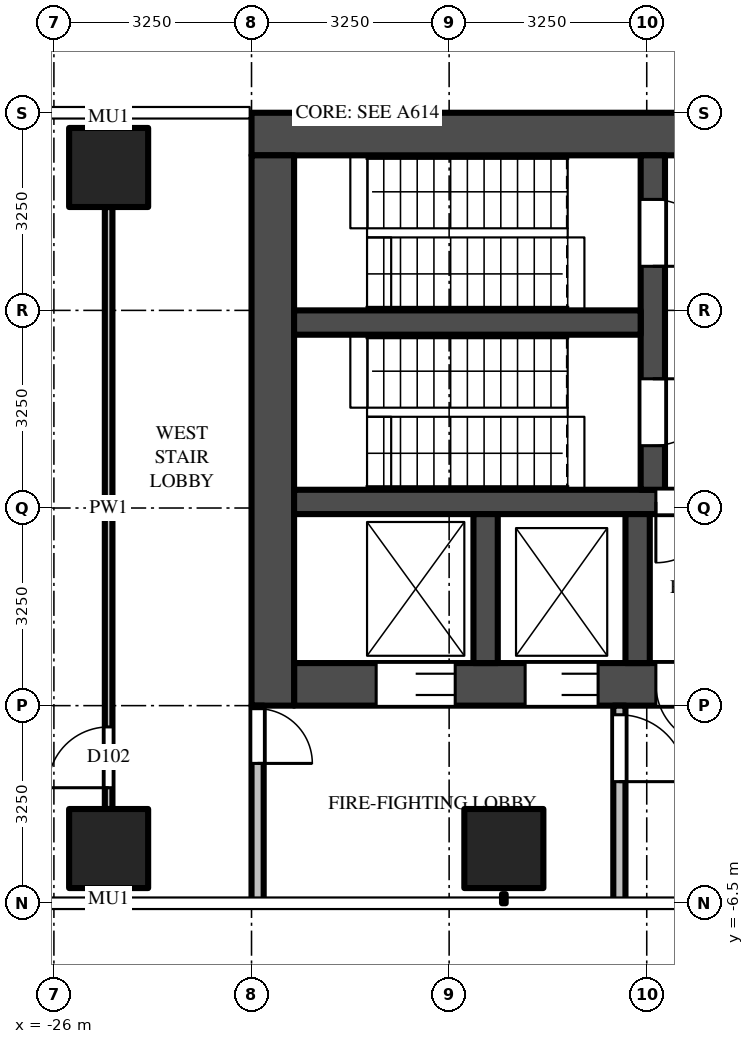
"""IFC4 building model, lengths in metres.
Left out: names, types, materials, properties, quantities, classifications, styles, units other than length and angle.
Written with IfcOpenShell. Run it as: python <this file> out.ifc"""

import sys

from ifc_helpers import new_model, si_unit, direction, frame, frame_2d, origin, origin_2d, place, context, subcontext, project, spatial, rectangle, extrude, source, transform, mapped, element, fill, save


model = new_model("IFC4")
c1 = context("Model", 3, precision=1e-05, world=origin(), true_north=direction((0.0, 1.0)))
c2 = subcontext(c1, "Body", "Model", "MODEL_VIEW")
j1 = project(units=[si_unit("LENGTHUNIT", "METRE"), si_unit("PLANEANGLEUNIT", "RADIAN")], contexts=[c1])
p1 = place(None, origin())
s1 = spatial("IfcSite", under=j1, at=p1, CompositionType="ELEMENT")
p2 = place(p1, origin())
s2 = spatial("IfcBuilding", under=s1, at=p2, CompositionType="ELEMENT")
p3 = place(p2, frame((0.0, 0.0, 111.0)))
s3 = spatial("IfcBuildingStorey", under=s2, at=p3, CompositionType="ELEMENT", Elevation=111.0)
m1 = source(origin(), c2, "Body", "SweptSolid", [
    extrude(rectangle(XDim=1.3, YDim=1.3, at=origin_2d()), origin(), (0.0, 0.0, 1.0), 4.5),
])
for number, where, z_axis, x_axis in (
    (1, (-18.6, -5.6, 0.0), (0.0, 0.0, 1.0), (1.0, 0.0, 0.0)),
    (2, (-25.1, -5.6, 0.0), (0.0, 0.0, 1.0), (1.0, 0.0, 0.0)),
    (3, (-25.1, 5.6, 0.0), (0.0, 0.0, 1.0), (1.0, 0.0, 0.0)),
):
    element("IfcColumn", number, at=place(p3, frame(where, z_axis=z_axis, x_axis=x_axis)), inside=s3, PredefinedType="COLUMN", context=c2, shape_type="MappedRepresentation", body=[
        mapped(m1, transform((0.0, 0.0, 0.0))),
    ])
m2 = source(origin(), c2, "Body", "SweptSolid", [
    extrude(rectangle(XDim=16.5, YDim=0.7, at=frame_2d((8.25, 0.0))), origin(), (0.0, 0.0, 1.0), 4.25),
])
p4 = place(p3, frame((-6.25, 6.15, 0.0), z_axis=(0.0, 0.0, 1.0), x_axis=(-1.0, 0.0, 0.0)))
e4 = element("IfcWall", 4, at=p4, inside=s3, PredefinedType="SHEAR", context=c2, shape_type="MappedRepresentation", body=[
    mapped(m2, transform((0.0, 0.0, 0.0))),
])
m3 = source(origin(), c2, "Body", "SweptSolid", [
    extrude(rectangle(XDim=14.85, YDim=0.7, at=frame_2d((7.425, 0.0))), origin(), (0.0, 0.0, 1.0), 4.25),
])
p5 = place(p3, frame((-7.2, -2.9, 0.0), z_axis=(0.0, 0.0, 1.0), x_axis=(-1.0, 0.0, 0.0)))
e5 = element("IfcWall", 5, at=p5, inside=s3, PredefinedType="SHEAR", context=c2, shape_type="MappedRepresentation", body=[
    mapped(m3, transform((0.0, 0.0, 0.0))),
])
m4 = source(origin(), c2, "Body", "SweptSolid", [
    extrude(rectangle(XDim=1.3, YDim=2.1, at=frame_2d((0.65, 1.05))), frame((0.0, 0.36, 0.0), z_axis=(0.0, -1.0, 0.0), x_axis=(1.0, 0.0, 0.0)), (0.0, 0.0, 1.0), 0.72),
])
p6 = place(p5, frame((12.2, 0.0, 0.0)))
e6 = element("IfcOpeningElement", 6, at=p6, cuts=e5, PredefinedType="OPENING", context=c2, shape_type="MappedRepresentation", body=[
    mapped(m4, transform((0.0, 0.0, 0.0))),
])
m5 = source(origin(), c2, "Body", "SweptSolid", [
    extrude(rectangle(XDim=1.2, YDim=2.1, at=frame_2d((0.6, 1.05))), frame((0.0, 0.36, 0.0), z_axis=(0.0, -1.0, 0.0), x_axis=(1.0, 0.0, 0.0)), (0.0, 0.0, 1.0), 0.72),
])
p7 = place(p5, frame((9.85, 0.0, 0.0)))
e7 = element("IfcOpeningElement", 7, at=p7, cuts=e5, PredefinedType="OPENING", context=c2, shape_type="MappedRepresentation", body=[
    mapped(m5, transform((0.0, 0.0, 0.0))),
])
m6 = source(origin(), c2, "Body", "SweptSolid", [
    extrude(rectangle(XDim=1.0, YDim=2.1, at=frame_2d((0.5, 1.05))), frame((0.0, 0.36, 0.0), z_axis=(0.0, -1.0, 0.0), x_axis=(1.0, 0.0, 0.0)), (0.0, 0.0, 1.0), 0.72),
])
p8 = place(p5, frame((7.9, 0.0, 0.0)))
e8 = element("IfcOpeningElement", 8, at=p8, cuts=e5, PredefinedType="OPENING", context=c2, shape_type="MappedRepresentation", body=[
    mapped(m6, transform((0.0, 0.0, 0.0))),
])
m7 = source(origin(), c2, "Body", "SweptSolid", [
    extrude(rectangle(XDim=0.8, YDim=2.1, at=frame_2d((0.4, 1.05))), frame((0.0, 0.36, 0.0), z_axis=(0.0, -1.0, 0.0), x_axis=(1.0, 0.0, 0.0)), (0.0, 0.0, 1.0), 0.72),
])
p9 = place(p5, frame((0.113, 0.0, 0.0)))
e9 = element("IfcOpeningElement", 9, at=p9, cuts=e5, PredefinedType="OPENING", context=c2, shape_type="MappedRepresentation", body=[
    mapped(m7, transform((0.0, 0.0, 0.0))),
])
p10 = place(p5, frame((1.288, 0.0, 0.0)))
e10 = element("IfcOpeningElement", 10, at=p10, cuts=e5, PredefinedType="OPENING", context=c2, shape_type="MappedRepresentation", body=[
    mapped(m7, transform((0.0, 0.0, 0.0))),
])
p11 = place(p5, frame((2.712, 0.0, 0.0)))
e11 = element("IfcOpeningElement", 11, at=p11, cuts=e5, PredefinedType="OPENING", context=c2, shape_type="MappedRepresentation", body=[
    mapped(m7, transform((0.0, 0.0, 0.0))),
])
p12 = place(p5, frame((3.887, 0.0, 0.0)))
e12 = element("IfcOpeningElement", 12, at=p12, cuts=e5, PredefinedType="OPENING", context=c2, shape_type="MappedRepresentation", body=[
    mapped(m7, transform((0.0, 0.0, 0.0))),
])
p13 = place(p5, frame((5.312, 0.0, 0.0)))
e13 = element("IfcOpeningElement", 13, at=p13, cuts=e5, PredefinedType="OPENING", context=c2, shape_type="MappedRepresentation", body=[
    mapped(m7, transform((0.0, 0.0, 0.0))),
])
p14 = place(p5, frame((6.488, 0.0, 0.0)))
e14 = element("IfcOpeningElement", 14, at=p14, cuts=e5, PredefinedType="OPENING", context=c2, shape_type="MappedRepresentation", body=[
    mapped(m7, transform((0.0, 0.0, 0.0))),
])
m8 = source(origin(), c2, "Body", "SweptSolid", [
    extrude(rectangle(XDim=9.05, YDim=0.7, at=frame_2d((4.525, 0.0))), origin(), (0.0, 0.0, 1.0), 4.25),
])
p15 = place(p3, frame((-22.4, 5.8, 0.0), z_axis=(0.0, 0.0, 1.0), x_axis=(0.0, -1.0, 0.0)))
e15 = element("IfcWall", 15, at=p15, inside=s3, PredefinedType="SHEAR", context=c2, shape_type="MappedRepresentation", body=[
    mapped(m8, transform((0.0, 0.0, 0.0))),
])
m9 = source(origin(), c2, "Body", "SweptSolid", [
    extrude(rectangle(XDim=14.85, YDim=0.4, at=frame_2d((7.425, 0.0))), origin(), (0.0, 0.0, 1.0), 4.25),
])
p16 = place(p3, frame((-7.2, 0.1, 0.0), z_axis=(0.0, 0.0, 1.0), x_axis=(-1.0, 0.0, 0.0)))
e16 = element("IfcWall", 16, at=p16, inside=s3, PredefinedType="SHEAR", context=c2, shape_type="MappedRepresentation", body=[
    mapped(m9, transform((0.0, 0.0, 0.0))),
])
m10 = source(origin(), c2, "Body", "SweptSolid", [
    extrude(rectangle(XDim=1.0, YDim=2.1, at=frame_2d((0.5, 1.05))), frame((0.0, 0.21, 0.0), z_axis=(0.0, -1.0, 0.0), x_axis=(1.0, 0.0, 0.0)), (0.0, 0.0, 1.0), 0.42),
])
p17 = place(p16, frame((7.9, 0.0, 0.0)))
e17 = element("IfcOpeningElement", 17, at=p17, cuts=e16, PredefinedType="OPENING", context=c2, shape_type="MappedRepresentation", body=[
    mapped(m10, transform((0.0, 0.0, 0.0))),
])
m11 = source(origin(), c2, "Body", "SweptSolid", [
    extrude(rectangle(XDim=5.5, YDim=0.4, at=frame_2d((2.75, 0.0))), origin(), (0.0, 0.0, 1.0), 4.25),
])
p18 = place(p3, frame((-16.15, 5.8, 0.0), z_axis=(0.0, 0.0, 1.0), x_axis=(0.0, -1.0, 0.0)))
e18 = element("IfcWall", 18, at=p18, inside=s3, PredefinedType="SHEAR", context=c2, shape_type="MappedRepresentation", body=[
    mapped(m11, transform((0.0, 0.0, 0.0))),
])
m12 = source(origin(), c2, "Body", "SweptSolid", [
    extrude(rectangle(XDim=1.1, YDim=2.1, at=frame_2d((0.55, 1.05))), frame((0.0, 0.21, 0.0), z_axis=(0.0, -1.0, 0.0), x_axis=(1.0, 0.0, 0.0)), (0.0, 0.0, 1.0), 0.42),
])
p19 = place(p18, frame((0.725, 0.0, 0.0)))
e19 = element("IfcOpeningElement", 19, at=p19, cuts=e18, PredefinedType="OPENING", context=c2, shape_type="MappedRepresentation", body=[
    mapped(m12, transform((0.0, 0.0, 0.0))),
])
p20 = place(p18, frame((3.675, 0.0, 0.0)))
e20 = element("IfcOpeningElement", 20, at=p20, cuts=e18, PredefinedType="OPENING", context=c2, shape_type="MappedRepresentation", body=[
    mapped(m12, transform((0.0, 0.0, 0.0))),
])
m13 = source(origin(), c2, "Body", "SweptSolid", [
    extrude(rectangle(XDim=5.7, YDim=0.4, at=frame_2d((2.85, 0.0))), origin(), (0.0, 0.0, 1.0), 4.25),
])
p21 = place(p3, frame((-16.35, 3.05, 0.0), z_axis=(0.0, 0.0, 1.0), x_axis=(-1.0, 0.0, 0.0)))
e21 = element("IfcWall", 21, at=p21, inside=s3, PredefinedType="SHEAR", context=c2, shape_type="MappedRepresentation", body=[
    mapped(m13, transform((0.0, 0.0, 0.0))),
])
m14 = source(origin(), c2, "Body", "SweptSolid", [
    extrude(rectangle(XDim=2.45, YDim=0.4, at=frame_2d((1.225, 0.0))), origin(), (0.0, 0.0, 1.0), 4.25),
])
for number, where, z_axis, x_axis in (
    (22, (-16.4, -0.1, 0.0), (0.0, 0.0, 1.0), (0.0, -1.0, 0.0)),
    (23, (-18.9, -0.1, 0.0), (0.0, 0.0, 1.0), (0.0, -1.0, 0.0)),
):
    element("IfcWall", number, at=place(p3, frame(where, z_axis=z_axis, x_axis=x_axis)), inside=s3, PredefinedType="SHEAR", context=c2, shape_type="MappedRepresentation", body=[
        mapped(m14, transform((0.0, 0.0, 0.0))),
    ])
m15 = source(origin(), c2, "Body", "SweptSolid", [
    extrude(rectangle(XDim=3.25, YDim=0.2, at=frame_2d((1.625, 0.0))), origin(), (0.0, 0.0, 1.0), 4.25),
])
p22 = place(p3, frame((-16.7, -3.25, 0.0), z_axis=(0.0, 0.0, 1.0), x_axis=(0.0, -1.0, 0.0)))
e24 = element("IfcWall", 24, at=p22, inside=s3, PredefinedType="PARTITIONING", context=c2, shape_type="MappedRepresentation", body=[
    mapped(m15, transform((0.0, 0.0, 0.0))),
])
m16 = source(origin(), c2, "Body", "SweptSolid", [
    extrude(rectangle(XDim=1.1, YDim=2.1, at=frame_2d((0.55, 1.05))), frame((0.0, 0.11, 0.0), z_axis=(0.0, -1.0, 0.0), x_axis=(1.0, 0.0, 0.0)), (0.0, 0.0, 1.0), 0.22),
])
p23 = place(p22, frame((0.15, 0.0, 0.0)))
e25 = element("IfcOpeningElement", 25, at=p23, cuts=e24, PredefinedType="OPENING", context=c2, shape_type="MappedRepresentation", body=[
    mapped(m16, transform((0.0, 0.0, 0.0))),
])
p24 = place(p3, frame((-22.65, -3.25, 0.0), z_axis=(0.0, 0.0, 1.0), x_axis=(0.0, -1.0, 0.0)))
e26 = element("IfcWall", 26, at=p24, inside=s3, PredefinedType="PARTITIONING", context=c2, shape_type="MappedRepresentation", body=[
    mapped(m15, transform((0.0, 0.0, 0.0))),
])
m17 = source(origin(), c2, "Body", "SweptSolid", [
    extrude(rectangle(XDim=0.9, YDim=2.1, at=frame_2d((0.45, 1.05))), frame((0.0, 0.11, 0.0), z_axis=(0.0, -1.0, 0.0), x_axis=(1.0, 0.0, 0.0)), (0.0, 0.0, 1.0), 0.22),
])
p25 = place(p24, frame((0.05, 0.0, 0.0)))
e27 = element("IfcOpeningElement", 27, at=p25, cuts=e26, PredefinedType="OPENING", context=c2, shape_type="MappedRepresentation", body=[
    mapped(m17, transform((0.0, 0.0, 0.0))),
])
m18 = source(origin(), c2, "Body", "SweptSolid", [
    extrude(rectangle(XDim=9.9, YDim=0.125, at=frame_2d((4.95, 0.0))), origin(), (0.0, 0.0, 1.0), 3.468),
])
p26 = place(p3, frame((-25.1, -4.95, 0.0), z_axis=(0.0, 0.0, 1.0), x_axis=(0.0, 1.0, 0.0)))
e28 = element("IfcWall", 28, at=p26, inside=s3, PredefinedType="PARTITIONING", context=c2, shape_type="MappedRepresentation", body=[
    mapped(m18, transform((0.0, 0.0, 0.0))),
])
m19 = source(origin(), c2, "Body", "SweptSolid", [
    extrude(rectangle(XDim=1.0, YDim=2.1, at=frame_2d((0.5, 1.05))), frame((0.0, 0.073, 0.0), z_axis=(0.0, -1.0, 0.0), x_axis=(1.0, 0.0, 0.0)), (0.0, 0.0, 1.0), 0.145),
])
p27 = place(p26, frame((0.35, 0.0, 0.0)))
e29 = element("IfcOpeningElement", 29, at=p27, cuts=e28, PredefinedType="OPENING", context=c2, shape_type="MappedRepresentation", body=[
    mapped(m19, transform((0.0, 0.0, 0.0))),
])
m20 = source(origin(), c2, "Body", "SweptSolid", [
    extrude(rectangle(XDim=1.3, YDim=2.1, at=frame_2d((0.65, 1.05))), frame((0.0, -0.275, 0.0), z_axis=(0.0, -1.0, 0.0), x_axis=(1.0, 0.0, 0.0)), (0.0, 0.0, 1.0), 0.05),
])
p28 = place(p6, origin())
e30 = element("IfcDoor", 30, at=p28, inside=s3, OperationType="DOUBLE_DOOR_SLIDING", PredefinedType="DOOR", context=c2, shape_type="MappedRepresentation", body=[
    mapped(m20, transform((0.0, 0.0, 0.0))),
])
fill(e6, e30)
m21 = source(origin(), c2, "Body", "SweptSolid", [
    extrude(rectangle(XDim=1.2, YDim=2.1, at=frame_2d((0.6, 1.05))), frame((0.0, -0.275, 0.0), z_axis=(0.0, -1.0, 0.0), x_axis=(1.0, 0.0, 0.0)), (0.0, 0.0, 1.0), 0.05),
])
p29 = place(p7, origin())
e31 = element("IfcDoor", 31, at=p29, inside=s3, OperationType="DOUBLE_DOOR_SLIDING", PredefinedType="DOOR", context=c2, shape_type="MappedRepresentation", body=[
    mapped(m21, transform((0.0, 0.0, 0.0))),
])
fill(e7, e31)
m22 = source(origin(), c2, "Body", "SweptSolid", [
    extrude(rectangle(XDim=1.1, YDim=2.1, at=frame_2d((0.55, 1.05))), frame((0.0, 0.025, 0.0), z_axis=(0.0, -1.0, 0.0), x_axis=(1.0, 0.0, 0.0)), (0.0, 0.0, 1.0), 0.05),
])
p30 = place(p19, origin())
e32 = element("IfcDoor", 32, at=p30, inside=s3, OperationType="SINGLE_SWING_RIGHT", PredefinedType="DOOR", context=c2, shape_type="MappedRepresentation", body=[
    mapped(m22, transform((0.0, 0.0, 0.0))),
])
fill(e19, e32)
p31 = place(p20, origin())
e33 = element("IfcDoor", 33, at=p31, inside=s3, OperationType="SINGLE_SWING_LEFT", PredefinedType="DOOR", context=c2, shape_type="MappedRepresentation", body=[
    mapped(m22, transform((0.0, 0.0, 0.0))),
])
fill(e20, e33)
m23 = source(origin(), c2, "Body", "SweptSolid", [
    extrude(rectangle(XDim=1.0, YDim=2.1, at=frame_2d((0.5, 1.05))), frame((0.0, 0.025, 0.0), z_axis=(0.0, -1.0, 0.0), x_axis=(1.0, 0.0, 0.0)), (0.0, 0.0, 1.0), 0.05),
])
p32 = place(p17, origin())
e34 = element("IfcDoor", 34, at=p32, inside=s3, OperationType="SINGLE_SWING_RIGHT", PredefinedType="DOOR", context=c2, shape_type="MappedRepresentation", body=[
    mapped(m23, transform((0.0, 0.0, 0.0))),
])
fill(e17, e34)
m24 = source(origin(), c2, "Body", "SweptSolid", [
    extrude(rectangle(XDim=1.0, YDim=2.1, at=frame_2d((0.5, 1.05))), frame((0.0, -0.275, 0.0), z_axis=(0.0, -1.0, 0.0), x_axis=(1.0, 0.0, 0.0)), (0.0, 0.0, 1.0), 0.05),
])
p33 = place(p8, origin())
e35 = element("IfcDoor", 35, at=p33, inside=s3, OperationType="SINGLE_SWING_LEFT", PredefinedType="DOOR", context=c2, shape_type="MappedRepresentation", body=[
    mapped(m24, transform((0.0, 0.0, 0.0))),
])
fill(e8, e35)
p34 = place(p23, origin())
e36 = element("IfcDoor", 36, at=p34, inside=s3, OperationType="SINGLE_SWING_RIGHT", PredefinedType="DOOR", context=c2, shape_type="MappedRepresentation", body=[
    mapped(m22, transform((0.0, 0.0, 0.0))),
])
fill(e25, e36)
m25 = source(origin(), c2, "Body", "SweptSolid", [
    extrude(rectangle(XDim=0.9, YDim=2.1, at=frame_2d((0.45, 1.05))), frame((0.0, 0.025, 0.0), z_axis=(0.0, -1.0, 0.0), x_axis=(1.0, 0.0, 0.0)), (0.0, 0.0, 1.0), 0.05),
])
p35 = place(p25, origin())
e37 = element("IfcDoor", 37, at=p35, inside=s3, OperationType="SINGLE_SWING_RIGHT", PredefinedType="DOOR", context=c2, shape_type="MappedRepresentation", body=[
    mapped(m25, transform((0.0, 0.0, 0.0))),
])
fill(e27, e37)
p36 = place(p27, origin())
e38 = element("IfcDoor", 38, at=p36, inside=s3, OperationType="SINGLE_SWING_LEFT", PredefinedType="DOOR", context=c2, shape_type="MappedRepresentation", body=[
    mapped(m23, transform((0.0, 0.0, 0.0))),
])
fill(e29, e38)
save(model, sys.argv[1])
